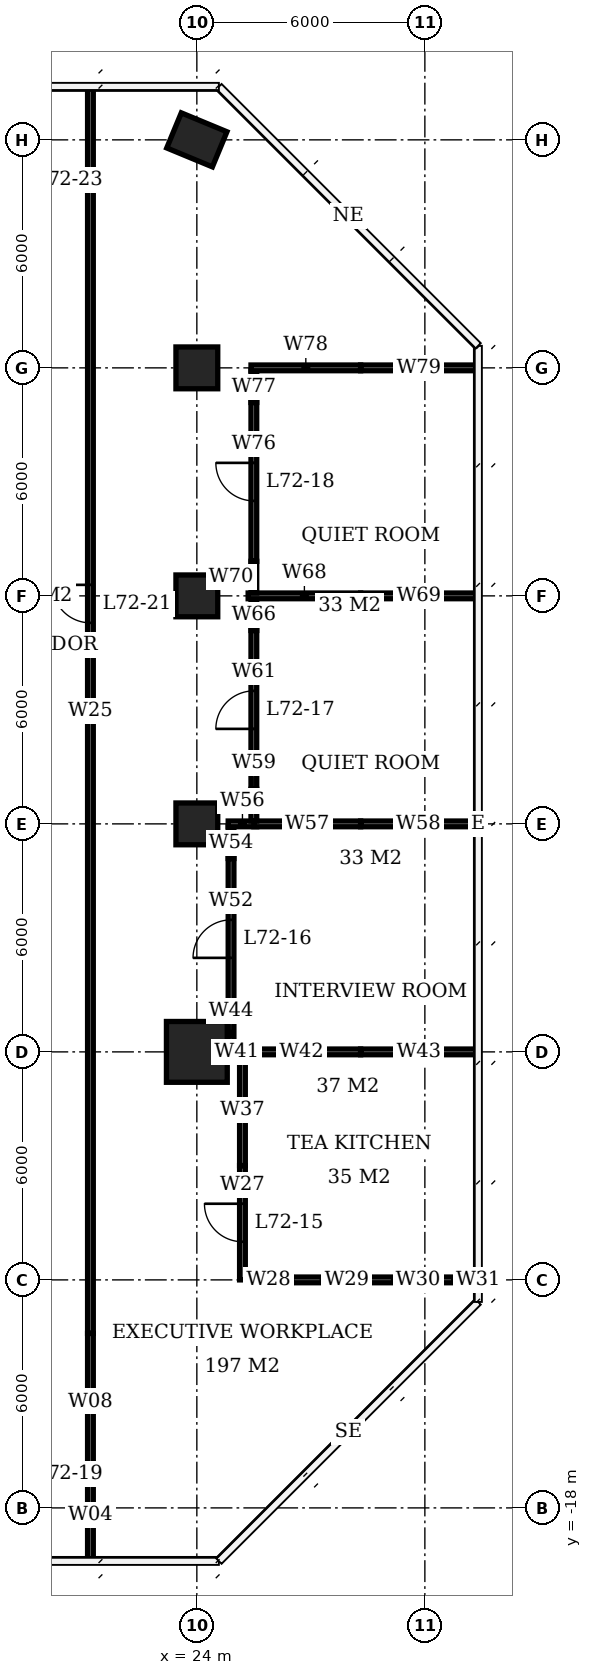
"""IFC4 building model, lengths in metres.
Left out: names, types, materials, properties, quantities, classifications, styles, units other than length and angle.
Written with IfcOpenShell. Run it as: python <this file> out.ifc"""

import sys

from ifc_helpers import new_model, si_unit, direction, frame, frame_2d, origin, origin_2d, place, context, subcontext, project, spatial, rectangle, extrude, element, fill, save


model = new_model("IFC4")
c1 = context("Model", 3, precision=1e-05, world=origin(), true_north=direction((0.0, 1.0)))
c2 = subcontext(c1, "Body", "Model", "MODEL_VIEW")
j1 = project(units=[si_unit("LENGTHUNIT", "METRE"), si_unit("PLANEANGLEUNIT", "RADIAN")], contexts=[c1])
p1 = place(None, origin())
s1 = spatial("IfcSite", under=j1, at=p1, CompositionType="ELEMENT")
p2 = place(p1, origin())
s2 = spatial("IfcBuilding", under=s1, at=p2, CompositionType="ELEMENT")
p3 = place(p2, frame((0.0, 0.0, 291.8)))
s3 = spatial("IfcBuildingStorey", under=s2, at=p3, CompositionType="ELEMENT", Elevation=291.8)
p4 = place(p3, frame((24.0, -6.0, 0.0), z_axis=(0.0, 0.0, 1.0), x_axis=(1.0, 0.0, 0.0)))
e1 = element("IfcColumn", 1, at=p4, inside=s3, PredefinedType="COLUMN", context=c2, shape_type="SweptSolid", body=[
    extrude(rectangle(XDim=1.6, YDim=1.6, at=origin_2d()), origin(), (0.0, 0.0, 1.0), 3.9),
])
for number, where, z_axis, x_axis in (
    (2, (24.0, 0.0, 0.0), (0.0, 0.0, 1.0), (1.0, 0.0, 0.0)),
    (3, (24.0, 6.0, 0.0), (0.0, 0.0, 1.0), (1.0, 0.0, 0.0)),
    (4, (24.0, 12.0, 0.0), (0.0, 0.0, 1.0), (1.0, 0.0, 0.0)),
):
    element("IfcColumn", number, at=place(p3, frame(where, z_axis=z_axis, x_axis=x_axis)), inside=s3, PredefinedType="COLUMN", context=c2, shape_type="SweptSolid", body=[
        extrude(rectangle(XDim=1.1, YDim=1.1, at=origin_2d()), origin(), (0.0, 0.0, 1.0), 3.9),
    ])
p5 = place(p3, frame((24.0, 18.0, 0.0), z_axis=(0.0, 0.0, 1.0), x_axis=(0.923879532511, -0.382683432365, 0.0)))
e5 = element("IfcColumn", 5, at=p5, inside=s3, PredefinedType="COLUMN", context=c2, shape_type="SweptSolid", body=[
    extrude(rectangle(XDim=1.3, YDim=1.0, at=origin_2d()), origin(), (0.0, 0.0, 1.0), 3.9),
])
p6 = place(p3, frame((25.285, -12.0, 0.0), z_axis=(0.0, 0.0, 1.0), x_axis=(1.0, 0.0, 0.0)))
e6 = element("IfcWall", 6, at=p6, inside=s3, PredefinedType="PARTITIONING", context=c2, shape_type="SweptSolid", body=[
    extrude(rectangle(XDim=1.205, YDim=0.15, at=frame_2d((0.603, 0.0))), origin(), (0.0, 0.0, 1.0), 2.65),
])
p7 = place(p3, frame((26.49, -12.0, 0.0), z_axis=(0.0, 0.0, 1.0), x_axis=(1.0, 0.0, 0.0)))
e7 = element("IfcWall", 7, at=p7, inside=s3, PredefinedType="PARTITIONING", context=c2, shape_type="SweptSolid", body=[
    extrude(rectangle(XDim=1.718, YDim=0.15, at=frame_2d((0.859, 0.0))), origin(), (0.0, 0.0, 1.0), 3.65),
])
p8 = place(p3, frame((28.208, -12.0, 0.0), z_axis=(0.0, 0.0, 1.0), x_axis=(1.0, 0.0, 0.0)))
e8 = element("IfcWall", 8, at=p8, inside=s3, PredefinedType="PARTITIONING", context=c2, shape_type="SweptSolid", body=[
    extrude(rectangle(XDim=2.029, YDim=0.15, at=frame_2d((1.015, 0.0))), origin(), (0.0, 0.0, 1.0), 2.65),
])
p9 = place(p3, frame((30.237, -12.0, 0.0), z_axis=(0.0, 0.0, 1.0), x_axis=(1.0, 0.0, 0.0)))
e9 = element("IfcWall", 9, at=p9, inside=s3, PredefinedType="PARTITIONING", context=c2, shape_type="SweptSolid", body=[
    extrude(rectangle(XDim=1.138, YDim=0.15, at=frame_2d((0.569, 0.0))), origin(), (0.0, 0.0, 1.0), 3.65),
])
p10 = place(p3, frame((24.825, -6.0, 0.0), z_axis=(0.0, 0.0, 1.0), x_axis=(1.0, 0.0, 0.0)))
e10 = element("IfcWall", 10, at=p10, inside=s3, PredefinedType="PARTITIONING", context=c2, shape_type="SweptSolid", body=[
    extrude(rectangle(XDim=0.45, YDim=0.15, at=frame_2d((0.225, 0.0))), origin(), (0.0, 0.0, 1.0), 2.65),
])
p11 = place(p3, frame((25.2, -6.0, 0.0), z_axis=(0.0, 0.0, 1.0), x_axis=(1.0, 0.0, 0.0)))
e11 = element("IfcWall", 11, at=p11, inside=s3, PredefinedType="PARTITIONING", context=c2, shape_type="SweptSolid", body=[
    extrude(rectangle(XDim=3.11, YDim=0.15, at=frame_2d((1.555, 0.0))), origin(), (0.0, 0.0, 1.0), 2.65),
])
p12 = place(p3, frame((28.31, -6.0, 0.0), z_axis=(0.0, 0.0, 1.0), x_axis=(1.0, 0.0, 0.0)))
e12 = element("IfcWall", 12, at=p12, inside=s3, PredefinedType="PARTITIONING", context=c2, shape_type="SweptSolid", body=[
    extrude(rectangle(XDim=3.065, YDim=0.15, at=frame_2d((1.532, 0.0))), origin(), (0.0, 0.0, 1.0), 3.65),
])
p13 = place(p3, frame((24.825, 0.0, 0.0), z_axis=(0.0, 0.0, 1.0), x_axis=(1.0, 0.0, 0.0)))
e13 = element("IfcWall", 13, at=p13, inside=s3, PredefinedType="PARTITIONING", context=c2, shape_type="SweptSolid", body=[
    extrude(rectangle(XDim=0.75, YDim=0.15, at=frame_2d((0.375, 0.0))), origin(), (0.0, 0.0, 1.0), 2.65),
])
p14 = place(p3, frame((25.5, 0.0, 0.0), z_axis=(0.0, 0.0, 1.0), x_axis=(1.0, 0.0, 0.0)))
e14 = element("IfcWall", 14, at=p14, inside=s3, PredefinedType="PARTITIONING", context=c2, shape_type="SweptSolid", body=[
    extrude(rectangle(XDim=2.81, YDim=0.15, at=frame_2d((1.405, 0.0))), origin(), (0.0, 0.0, 1.0), 2.65),
])
p15 = place(p3, frame((28.31, 0.0, 0.0), z_axis=(0.0, 0.0, 1.0), x_axis=(1.0, 0.0, 0.0)))
e15 = element("IfcWall", 15, at=p15, inside=s3, PredefinedType="PARTITIONING", context=c2, shape_type="SweptSolid", body=[
    extrude(rectangle(XDim=3.04, YDim=0.15, at=frame_2d((1.52, 0.0))), origin(), (0.0, 0.0, 1.0), 3.65),
])
p16 = place(p3, frame((25.35, 6.0, 0.0), z_axis=(0.0, 0.0, 1.0), x_axis=(1.0, 0.0, 0.0)))
e16 = element("IfcWall", 16, at=p16, inside=s3, PredefinedType="PARTITIONING", context=c2, shape_type="SweptSolid", body=[
    extrude(rectangle(XDim=2.96, YDim=0.15, at=frame_2d((1.48, 0.0))), origin(), (0.0, 0.0, 1.0), 2.65),
])
p17 = place(p3, frame((28.31, 6.0, 0.0), z_axis=(0.0, 0.0, 1.0), x_axis=(1.0, 0.0, 0.0)))
e17 = element("IfcWall", 17, at=p17, inside=s3, PredefinedType="PARTITIONING", context=c2, shape_type="SweptSolid", body=[
    extrude(rectangle(XDim=3.065, YDim=0.15, at=frame_2d((1.532, 0.0))), origin(), (0.0, 0.0, 1.0), 3.65),
])
p18 = place(p3, frame((25.425, 12.0, 0.0), z_axis=(0.0, 0.0, 1.0), x_axis=(1.0, 0.0, 0.0)))
e18 = element("IfcWall", 18, at=p18, inside=s3, PredefinedType="PARTITIONING", context=c2, shape_type="SweptSolid", body=[
    extrude(rectangle(XDim=2.885, YDim=0.15, at=frame_2d((1.442, 0.0))), origin(), (0.0, 0.0, 1.0), 2.65),
])
p19 = place(p3, frame((28.31, 12.0, 0.0), z_axis=(0.0, 0.0, 1.0), x_axis=(1.0, 0.0, 0.0)))
e19 = element("IfcWall", 19, at=p19, inside=s3, PredefinedType="PARTITIONING", context=c2, shape_type="SweptSolid", body=[
    extrude(rectangle(XDim=3.065, YDim=0.15, at=frame_2d((1.532, 0.0))), origin(), (0.0, 0.0, 1.0), 3.65),
])
p20 = place(p3, frame((24.9, -5.925, 0.0), z_axis=(0.0, 0.0, 1.0), x_axis=(0.0, 1.0, 0.0)))
e20 = element("IfcWall", 20, at=p20, inside=s3, PredefinedType="PARTITIONING", context=c2, shape_type="SweptSolid", body=[
    extrude(rectangle(XDim=0.783, YDim=0.15, at=frame_2d((0.392, 0.0))), origin(), (0.0, 0.0, 1.0), 2.65),
])
p21 = place(p3, frame((24.9, -5.142, 0.0), z_axis=(0.0, 0.0, 1.0), x_axis=(0.0, 1.0, 0.0)))
e21 = element("IfcWall", 21, at=p21, inside=s3, PredefinedType="PARTITIONING", context=c2, shape_type="SweptSolid", body=[
    extrude(rectangle(XDim=4.232, YDim=0.15, at=frame_2d((2.116, 0.0))), origin(), (0.0, 0.0, 1.0), 3.65),
])
p22 = place(p21, frame((1.616, 0.0, 0.0)))
e22 = element("IfcOpeningElement", 22, at=p22, cuts=e21, PredefinedType="OPENING", context=c2, shape_type="SweptSolid", body=[
    extrude(rectangle(XDim=1.0, YDim=2.4, at=frame_2d((0.5, 1.2))), frame((0.0, 0.085, 0.0), z_axis=(0.0, -1.0, 0.0), x_axis=(1.0, 0.0, 0.0)), (0.0, 0.0, 1.0), 0.17),
])
p23 = place(p3, frame((24.9, -0.91, 0.0), z_axis=(0.0, 0.0, 1.0), x_axis=(0.0, 1.0, 0.0)))
e23 = element("IfcWall", 23, at=p23, inside=s3, PredefinedType="PARTITIONING", context=c2, shape_type="SweptSolid", body=[
    extrude(rectangle(XDim=0.835, YDim=0.15, at=frame_2d((0.417, 0.0))), origin(), (0.0, 0.0, 1.0), 2.65),
])
p24 = place(p3, frame((25.2, -12.0, 0.0), z_axis=(0.0, 0.0, 1.0), x_axis=(0.0, 1.0, 0.0)))
e24 = element("IfcWall", 24, at=p24, inside=s3, PredefinedType="PARTITIONING", context=c2, shape_type="SweptSolid", body=[
    extrude(rectangle(XDim=3.008, YDim=0.15, at=frame_2d((1.504, 0.0))), origin(), (0.0, 0.0, 1.0), 3.65),
])
p25 = place(p24, frame((1.004, 0.0, 0.0)))
e25 = element("IfcOpeningElement", 25, at=p25, cuts=e24, PredefinedType="OPENING", context=c2, shape_type="SweptSolid", body=[
    extrude(rectangle(XDim=1.0, YDim=2.4, at=frame_2d((0.5, 1.2))), frame((0.0, 0.085, 0.0), z_axis=(0.0, -1.0, 0.0), x_axis=(1.0, 0.0, 0.0)), (0.0, 0.0, 1.0), 0.17),
])
p26 = place(p3, frame((25.2, -8.992, 0.0), z_axis=(0.0, 0.0, 1.0), x_axis=(0.0, 1.0, 0.0)))
e26 = element("IfcWall", 26, at=p26, inside=s3, PredefinedType="PARTITIONING", context=c2, shape_type="SweptSolid", body=[
    extrude(rectangle(XDim=2.917, YDim=0.15, at=frame_2d((1.458, 0.0))), origin(), (0.0, 0.0, 1.0), 2.65),
])
p27 = place(p3, frame((25.5, 0.075, 0.0), z_axis=(0.0, 0.0, 1.0), x_axis=(0.0, 1.0, 0.0)))
e27 = element("IfcWall", 27, at=p27, inside=s3, PredefinedType="PARTITIONING", context=c2, shape_type="SweptSolid", body=[
    extrude(rectangle(XDim=0.835, YDim=0.15, at=frame_2d((0.417, 0.0))), origin(), (0.0, 0.0, 1.0), 2.65),
])
p28 = place(p3, frame((25.5, 0.91, 0.0), z_axis=(0.0, 0.0, 1.0), x_axis=(0.0, 1.0, 0.0)))
e28 = element("IfcWall", 28, at=p28, inside=s3, PredefinedType="PARTITIONING", context=c2, shape_type="SweptSolid", body=[
    extrude(rectangle(XDim=4.18, YDim=0.15, at=frame_2d((2.09, 0.0))), origin(), (0.0, 0.0, 1.0), 3.65),
])
p29 = place(p28, frame((1.59, 0.0, 0.0)))
e29 = element("IfcOpeningElement", 29, at=p29, cuts=e28, PredefinedType="OPENING", context=c2, shape_type="SweptSolid", body=[
    extrude(rectangle(XDim=1.0, YDim=2.4, at=frame_2d((0.5, 1.2))), frame((0.0, 0.085, 0.0), z_axis=(0.0, -1.0, 0.0), x_axis=(1.0, 0.0, 0.0)), (0.0, 0.0, 1.0), 0.17),
])
for number, where, z_axis, x_axis in (
    (30, (25.5, 5.09, 0.0), (0.0, 0.0, 1.0), (0.0, 1.0, 0.0)),
    (31, (25.5, 6.075, 0.0), (0.0, 0.0, 1.0), (0.0, 1.0, 0.0)),
):
    element("IfcWall", number, at=place(p3, frame(where, z_axis=z_axis, x_axis=x_axis)), inside=s3, PredefinedType="PARTITIONING", context=c2, shape_type="SweptSolid", body=[
        extrude(rectangle(XDim=0.835, YDim=0.15, at=frame_2d((0.417, 0.0))), origin(), (0.0, 0.0, 1.0), 2.65),
    ])
p30 = place(p3, frame((25.5, 6.91, 0.0), z_axis=(0.0, 0.0, 1.0), x_axis=(0.0, 1.0, 0.0)))
e32 = element("IfcWall", 32, at=p30, inside=s3, PredefinedType="PARTITIONING", context=c2, shape_type="SweptSolid", body=[
    extrude(rectangle(XDim=4.18, YDim=0.15, at=frame_2d((2.09, 0.0))), origin(), (0.0, 0.0, 1.0), 3.65),
])
p31 = place(p30, frame((1.59, 0.0, 0.0)))
e33 = element("IfcOpeningElement", 33, at=p31, cuts=e32, PredefinedType="OPENING", context=c2, shape_type="SweptSolid", body=[
    extrude(rectangle(XDim=1.0, YDim=2.4, at=frame_2d((0.5, 1.2))), frame((0.0, 0.085, 0.0), z_axis=(0.0, -1.0, 0.0), x_axis=(1.0, 0.0, 0.0)), (0.0, 0.0, 1.0), 0.17),
])
p32 = place(p3, frame((25.5, 11.09, 0.0), z_axis=(0.0, 0.0, 1.0), x_axis=(0.0, 1.0, 0.0)))
e34 = element("IfcWall", 34, at=p32, inside=s3, PredefinedType="PARTITIONING", context=c2, shape_type="SweptSolid", body=[
    extrude(rectangle(XDim=0.835, YDim=0.15, at=frame_2d((0.417, 0.0))), origin(), (0.0, 0.0, 1.0), 2.65),
])
p33 = place(p3, frame((21.2, -19.375, 0.0), z_axis=(0.0, 0.0, 1.0), x_axis=(0.0, 1.0, 0.0)))
e35 = element("IfcWall", 35, at=p33, inside=s3, PredefinedType="PARTITIONING", context=c2, shape_type="SweptSolid", body=[
    extrude(rectangle(XDim=2.383, YDim=0.15, at=frame_2d((1.191, 0.0))), origin(), (0.0, 0.0, 1.0), 3.65),
])
p34 = place(p3, frame((21.2, -16.992, 0.0), z_axis=(0.0, 0.0, 1.0), x_axis=(0.0, 1.0, 0.0)))
e36 = element("IfcWall", 36, at=p34, inside=s3, PredefinedType="PARTITIONING", context=c2, shape_type="SweptSolid", body=[
    extrude(rectangle(XDim=3.584, YDim=0.15, at=frame_2d((1.792, 0.0))), origin(), (0.0, 0.0, 1.0), 2.65),
])
p35 = place(p3, frame((21.2, -13.408, 0.0), z_axis=(0.0, 0.0, 1.0), x_axis=(0.0, 1.0, 0.0)))
e37 = element("IfcWall", 37, at=p35, inside=s3, PredefinedType="PARTITIONING", context=c2, shape_type="SweptSolid", body=[
    extrude(rectangle(XDim=32.783, YDim=0.15, at=frame_2d((16.392, 0.0))), origin(), (0.0, 0.0, 1.0), 3.65),
])
p36 = place(p35, frame((18.698, 0.0, 0.0)))
e38 = element("IfcOpeningElement", 38, at=p36, cuts=e37, PredefinedType="OPENING", context=c2, shape_type="SweptSolid", body=[
    extrude(rectangle(XDim=1.0, YDim=2.4, at=frame_2d((0.5, 1.2))), frame((0.0, 0.085, 0.0), z_axis=(0.0, -1.0, 0.0), x_axis=(1.0, 0.0, 0.0)), (0.0, 0.0, 1.0), 0.17),
])
p37 = place(p25, origin())
e39 = element("IfcDoor", 39, at=p37, inside=s3, OperationType="SINGLE_SWING_RIGHT", PredefinedType="DOOR", context=c2, shape_type="SweptSolid", body=[
    extrude(rectangle(XDim=1.0, YDim=2.4, at=frame_2d((0.5, 1.2))), frame((0.0, 0.025, 0.0), z_axis=(0.0, -1.0, 0.0), x_axis=(1.0, 0.0, 0.0)), (0.0, 0.0, 1.0), 0.05),
])
fill(e25, e39)
p38 = place(p22, origin())
e40 = element("IfcDoor", 40, at=p38, inside=s3, OperationType="SINGLE_SWING_LEFT", PredefinedType="DOOR", context=c2, shape_type="SweptSolid", body=[
    extrude(rectangle(XDim=1.0, YDim=2.4, at=frame_2d((0.5, 1.2))), frame((0.0, 0.025, 0.0), z_axis=(0.0, -1.0, 0.0), x_axis=(1.0, 0.0, 0.0)), (0.0, 0.0, 1.0), 0.05),
])
fill(e22, e40)
p39 = place(p29, origin())
e41 = element("IfcDoor", 41, at=p39, inside=s3, OperationType="SINGLE_SWING_LEFT", PredefinedType="DOOR", context=c2, shape_type="SweptSolid", body=[
    extrude(rectangle(XDim=1.0, YDim=2.4, at=frame_2d((0.5, 1.2))), frame((0.0, 0.025, 0.0), z_axis=(0.0, -1.0, 0.0), x_axis=(1.0, 0.0, 0.0)), (0.0, 0.0, 1.0), 0.05),
])
fill(e29, e41)
p40 = place(p31, origin())
e42 = element("IfcDoor", 42, at=p40, inside=s3, OperationType="SINGLE_SWING_RIGHT", PredefinedType="DOOR", context=c2, shape_type="SweptSolid", body=[
    extrude(rectangle(XDim=1.0, YDim=2.4, at=frame_2d((0.5, 1.2))), frame((0.0, 0.025, 0.0), z_axis=(0.0, -1.0, 0.0), x_axis=(1.0, 0.0, 0.0)), (0.0, 0.0, 1.0), 0.05),
])
fill(e33, e42)
p41 = place(p36, origin())
e43 = element("IfcDoor", 43, at=p41, inside=s3, OperationType="SINGLE_SWING_RIGHT", PredefinedType="DOOR", context=c2, shape_type="SweptSolid", body=[
    extrude(rectangle(XDim=1.0, YDim=2.4, at=frame_2d((0.5, 1.2))), frame((0.0, 0.025, 0.0), z_axis=(0.0, -1.0, 0.0), x_axis=(1.0, 0.0, 0.0)), (0.0, 0.0, 1.0), 0.05),
])
fill(e38, e43)
save(model, sys.argv[1])
